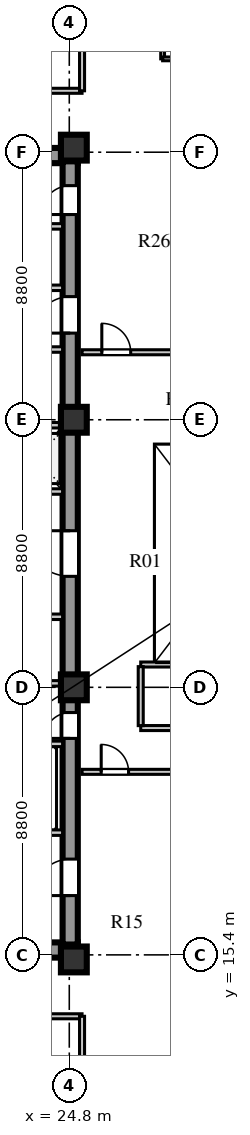
"""IFC4 building model, lengths in metres.
Left out: names, types, materials, properties, quantities, classifications, styles, units other than length and angle.
Written with IfcOpenShell. Run it as: python <this file> out.ifc"""

import sys

from ifc_helpers import new_model, si_unit, direction, frame, frame_2d, origin, origin_2d, place, context, subcontext, project, spatial, rectangle, extrude, element, fill, save


model = new_model("IFC4")
c1 = context("Model", 3, precision=1e-05, world=origin(), true_north=direction((0.0, 1.0)))
c2 = subcontext(c1, "Body", "Model", "MODEL_VIEW")
j1 = project(units=[si_unit("LENGTHUNIT", "METRE"), si_unit("PLANEANGLEUNIT", "RADIAN")], contexts=[c1])
p1 = place(None, origin())
s1 = spatial("IfcSite", under=j1, at=p1, CompositionType="ELEMENT")
p2 = place(p1, origin())
s2 = spatial("IfcBuilding", under=s1, at=p2, CompositionType="ELEMENT")
p3 = place(p2, frame((0.0, 0.0, 142.5)))
s3 = spatial("IfcBuildingStorey", under=s2, at=p3, CompositionType="ELEMENT", Elevation=142.5)
for number, where, z_axis, x_axis in (
    (1, (15.4, 15.56, 0.0), (0.0, 0.0, 1.0), (1.0, 0.0, 0.0)),
    (2, (15.4, 41.69, 0.0), (0.0, 0.0, 1.0), (1.0, 0.0, 0.0)),
):
    element("IfcWall", number, at=place(p3, frame(where, z_axis=z_axis, x_axis=x_axis)), inside=s3, PredefinedType="SHEAR", context=c2, shape_type="SweptSolid", body=[
        extrude(rectangle(XDim=9.68, YDim=0.5, at=frame_2d((4.84, 0.0))), origin(), (0.0, 0.0, 1.0), 3.6),
    ])
p4 = place(p3, frame((24.83, 15.74, 0.0), z_axis=(0.0, 0.0, 1.0), x_axis=(0.0, 1.0, 0.0)))
e3 = element("IfcWall", 3, at=p4, inside=s3, PredefinedType="SHEAR", context=c2, shape_type="SweptSolid", body=[
    extrude(rectangle(XDim=25.76, YDim=0.5, at=frame_2d((12.88, 0.0))), origin(), (0.0, 0.0, 1.0), 3.6),
])
p5 = place(p4, frame((1.61, 0.0, 0.0)))
e4 = element("IfcOpeningElement", 4, at=p5, cuts=e3, PredefinedType="OPENING", context=c2, shape_type="SweptSolid", body=[
    extrude(rectangle(XDim=1.2, YDim=2.1, at=frame_2d((0.6, 1.05))), frame((0.0, 0.26, 0.0), z_axis=(0.0, -1.0, 0.0), x_axis=(1.0, 0.0, 0.0)), (0.0, 0.0, 1.0), 0.52),
])
p6 = place(p4, frame((6.78, 0.0, 0.0)))
e5 = element("IfcOpeningElement", 5, at=p6, cuts=e3, PredefinedType="OPENING", context=c2, shape_type="SweptSolid", body=[
    extrude(rectangle(XDim=0.85, YDim=2.06, at=frame_2d((0.425, 1.03))), frame((0.0, 0.26, 0.0), z_axis=(0.0, -1.0, 0.0), x_axis=(1.0, 0.0, 0.0)), (0.0, 0.0, 1.0), 0.52),
])
p7 = place(p4, frame((12.11, 0.0, 0.0)))
e6 = element("IfcOpeningElement", 6, at=p7, cuts=e3, PredefinedType="OPENING", context=c2, shape_type="SweptSolid", body=[
    extrude(rectangle(XDim=1.5, YDim=2.12, at=frame_2d((0.75, 1.06))), frame((0.0, 0.26, 0.0), z_axis=(0.0, -1.0, 0.0), x_axis=(1.0, 0.0, 0.0)), (0.0, 0.0, 1.0), 0.52),
])
p8 = place(p4, frame((20.11, 0.0, 0.0)))
e7 = element("IfcOpeningElement", 7, at=p8, cuts=e3, PredefinedType="OPENING", context=c2, shape_type="SweptSolid", body=[
    extrude(rectangle(XDim=1.2, YDim=2.12, at=frame_2d((0.6, 1.06))), frame((0.0, 0.26, 0.0), z_axis=(0.0, -1.0, 0.0), x_axis=(1.0, 0.0, 0.0)), (0.0, 0.0, 1.0), 0.52),
])
p9 = place(p4, frame((24.01, 0.0, 0.0)))
e8 = element("IfcOpeningElement", 8, at=p9, cuts=e3, PredefinedType="OPENING", context=c2, shape_type="SweptSolid", body=[
    extrude(rectangle(XDim=0.95, YDim=2.1, at=frame_2d((0.475, 1.05))), frame((0.0, 0.26, 0.0), z_axis=(0.0, -1.0, 0.0), x_axis=(1.0, 0.0, 0.0)), (0.0, 0.0, 1.0), 0.52),
])
for number, where, z_axis, x_axis in (
    (9, (24.95, 15.25, 0.0), (0.0, 0.0, 1.0), (1.0, 0.0, 0.0)),
    (10, (24.95, 24.2, 0.0), (0.0, 0.0, 1.0), (1.0, 0.0, 0.0)),
    (11, (24.95, 33.0, 0.0), (0.0, 0.0, 1.0), (1.0, 0.0, 0.0)),
    (12, (24.95, 41.95, 0.0), (0.0, 0.0, 1.0), (1.0, 0.0, 0.0)),
):
    element("IfcColumn", number, at=place(p3, frame(where, z_axis=z_axis, x_axis=x_axis)), inside=s3, PredefinedType="COLUMN", context=c2, shape_type="SweptSolid", body=[
        extrude(rectangle(XDim=0.85, YDim=0.85, at=origin_2d()), origin(), (0.0, 0.0, 1.0), 3.6),
    ])
p10 = place(p3, frame((19.64, 19.42, 0.0), z_axis=(0.0, 0.0, 1.0), x_axis=(1.0, 0.0, 0.0)))
e13 = element("IfcWall", 13, at=p10, inside=s3, PredefinedType="SOLIDWALL", context=c2, shape_type="SweptSolid", body=[
    extrude(rectangle(XDim=4.94, YDim=0.18, at=frame_2d((2.47, 0.0))), origin(), (0.0, 0.0, 1.0), 3.6),
])
p11 = place(p10, frame((0.72, 0.0, 0.0)))
e14 = element("IfcOpeningElement", 14, at=p11, cuts=e13, PredefinedType="OPENING", context=c2, shape_type="SweptSolid", body=[
    extrude(rectangle(XDim=1.1, YDim=2.1, at=frame_2d((0.55, 1.05))), frame((0.0, 0.1, 0.0), z_axis=(0.0, -1.0, 0.0), x_axis=(1.0, 0.0, 0.0)), (0.0, 0.0, 1.0), 0.2),
])
p12 = place(p10, frame((3.02, 0.0, 0.0)))
e15 = element("IfcOpeningElement", 15, at=p12, cuts=e13, PredefinedType="OPENING", context=c2, shape_type="SweptSolid", body=[
    extrude(rectangle(XDim=1.1, YDim=2.1, at=frame_2d((0.55, 1.05))), frame((0.0, 0.1, 0.0), z_axis=(0.0, -1.0, 0.0), x_axis=(1.0, 0.0, 0.0)), (0.0, 0.0, 1.0), 0.2),
])
p13 = place(p3, frame((19.64, 22.34, 0.0), z_axis=(0.0, 0.0, 1.0), x_axis=(1.0, 0.0, 0.0)))
e16 = element("IfcWall", 16, at=p13, inside=s3, PredefinedType="SOLIDWALL", context=c2, shape_type="SweptSolid", body=[
    extrude(rectangle(XDim=4.94, YDim=0.18, at=frame_2d((2.47, 0.0))), origin(), (0.0, 0.0, 1.0), 3.6),
])
p14 = place(p3, frame((15.9, 26.52, 0.0), z_axis=(0.0, 0.0, 1.0), x_axis=(1.0, 0.0, 0.0)))
e17 = element("IfcWall", 17, at=p14, inside=s3, PredefinedType="SOLIDWALL", context=c2, shape_type="SweptSolid", body=[
    extrude(rectangle(XDim=8.68, YDim=0.18, at=frame_2d((4.34, 0.0))), origin(), (0.0, 0.0, 1.0), 3.6),
])
p15 = place(p14, frame((2.5, 0.0, 0.0)))
e18 = element("IfcOpeningElement", 18, at=p15, cuts=e17, PredefinedType="OPENING", context=c2, shape_type="SweptSolid", body=[
    extrude(rectangle(XDim=0.95, YDim=2.1, at=frame_2d((0.475, 1.05))), frame((0.0, 0.1, 0.0), z_axis=(0.0, -1.0, 0.0), x_axis=(1.0, 0.0, 0.0)), (0.0, 0.0, 1.0), 0.2),
])
p16 = place(p14, frame((6.0, 0.0, 0.0)))
e19 = element("IfcOpeningElement", 19, at=p16, cuts=e17, PredefinedType="OPENING", context=c2, shape_type="SweptSolid", body=[
    extrude(rectangle(XDim=0.95, YDim=2.1, at=frame_2d((0.475, 1.05))), frame((0.0, 0.1, 0.0), z_axis=(0.0, -1.0, 0.0), x_axis=(1.0, 0.0, 0.0)), (0.0, 0.0, 1.0), 0.2),
])
p17 = place(p3, frame((15.9, 24.33, 0.0), z_axis=(0.0, 0.0, 1.0), x_axis=(1.0, 0.0, 0.0)))
e20 = element("IfcWall", 20, at=p17, inside=s3, PredefinedType="SOLIDWALL", context=c2, shape_type="SweptSolid", body=[
    extrude(rectangle(XDim=8.68, YDim=0.18, at=frame_2d((4.34, 0.0))), origin(), (0.0, 0.0, 1.0), 2.95),
])
p18 = place(p3, frame((15.9, 30.64, 0.0), z_axis=(0.0, 0.0, 1.0), x_axis=(1.0, 0.0, 0.0)))
e21 = element("IfcWall", 21, at=p18, inside=s3, PredefinedType="SOLIDWALL", context=c2, shape_type="SweptSolid", body=[
    extrude(rectangle(XDim=8.68, YDim=0.18, at=frame_2d((4.34, 0.0))), origin(), (0.0, 0.0, 1.0), 3.6),
])
p19 = place(p18, frame((1.76, 0.0, 0.0)))
e22 = element("IfcOpeningElement", 22, at=p19, cuts=e21, PredefinedType="OPENING", context=c2, shape_type="SweptSolid", body=[
    extrude(rectangle(XDim=1.0, YDim=2.1, at=frame_2d((0.5, 1.05))), frame((0.0, 0.1, 0.0), z_axis=(0.0, -1.0, 0.0), x_axis=(1.0, 0.0, 0.0)), (0.0, 0.0, 1.0), 0.2),
])
p20 = place(p18, frame((3.6, 0.0, 0.0)))
e23 = element("IfcOpeningElement", 23, at=p20, cuts=e21, PredefinedType="OPENING", context=c2, shape_type="SweptSolid", body=[
    extrude(rectangle(XDim=1.0, YDim=2.1, at=frame_2d((0.5, 1.05))), frame((0.0, 0.1, 0.0), z_axis=(0.0, -1.0, 0.0), x_axis=(1.0, 0.0, 0.0)), (0.0, 0.0, 1.0), 0.2),
])
p21 = place(p18, frame((5.44, 0.0, 0.0)))
e24 = element("IfcOpeningElement", 24, at=p21, cuts=e21, PredefinedType="OPENING", context=c2, shape_type="SweptSolid", body=[
    extrude(rectangle(XDim=1.0, YDim=2.1, at=frame_2d((0.5, 1.05))), frame((0.0, 0.1, 0.0), z_axis=(0.0, -1.0, 0.0), x_axis=(1.0, 0.0, 0.0)), (0.0, 0.0, 1.0), 0.2),
])
p22 = place(p18, frame((7.28, 0.0, 0.0)))
e25 = element("IfcOpeningElement", 25, at=p22, cuts=e21, PredefinedType="OPENING", context=c2, shape_type="SweptSolid", body=[
    extrude(rectangle(XDim=1.0, YDim=2.1, at=frame_2d((0.5, 1.05))), frame((0.0, 0.1, 0.0), z_axis=(0.0, -1.0, 0.0), x_axis=(1.0, 0.0, 0.0)), (0.0, 0.0, 1.0), 0.2),
])
p23 = place(p3, frame((15.9, 32.82, 0.0), z_axis=(0.0, 0.0, 1.0), x_axis=(1.0, 0.0, 0.0)))
e26 = element("IfcWall", 26, at=p23, inside=s3, PredefinedType="SOLIDWALL", context=c2, shape_type="SweptSolid", body=[
    extrude(rectangle(XDim=8.68, YDim=0.18, at=frame_2d((4.34, 0.0))), origin(), (0.0, 0.0, 1.0), 2.95),
])
p24 = place(p3, frame((22.02, 35.31, 0.0), z_axis=(0.0, 0.0, 1.0), x_axis=(1.0, 0.0, 0.0)))
e27 = element("IfcWall", 27, at=p24, inside=s3, PredefinedType="SOLIDWALL", context=c2, shape_type="SweptSolid", body=[
    extrude(rectangle(XDim=2.56, YDim=0.18, at=frame_2d((1.28, 0.0))), origin(), (0.0, 0.0, 1.0), 3.6),
])
p25 = place(p24, frame((0.55, 0.0, 0.0)))
e28 = element("IfcOpeningElement", 28, at=p25, cuts=e27, PredefinedType="OPENING", context=c2, shape_type="SweptSolid", body=[
    extrude(rectangle(XDim=1.0, YDim=2.1, at=frame_2d((0.5, 1.05))), frame((0.0, 0.1, 0.0), z_axis=(0.0, -1.0, 0.0), x_axis=(1.0, 0.0, 0.0)), (0.0, 0.0, 1.0), 0.2),
])
p26 = place(p3, frame((19.64, 37.34, 0.0), z_axis=(0.0, 0.0, 1.0), x_axis=(1.0, 0.0, 0.0)))
e29 = element("IfcWall", 29, at=p26, inside=s3, PredefinedType="SOLIDWALL", context=c2, shape_type="SweptSolid", body=[
    extrude(rectangle(XDim=4.94, YDim=0.18, at=frame_2d((2.47, 0.0))), origin(), (0.0, 0.0, 1.0), 3.6),
])
p27 = place(p26, frame((0.45, 0.0, 0.0)))
e30 = element("IfcOpeningElement", 30, at=p27, cuts=e29, PredefinedType="OPENING", context=c2, shape_type="SweptSolid", body=[
    extrude(rectangle(XDim=1.0, YDim=2.1, at=frame_2d((0.5, 1.05))), frame((0.0, 0.1, 0.0), z_axis=(0.0, -1.0, 0.0), x_axis=(1.0, 0.0, 0.0)), (0.0, 0.0, 1.0), 0.2),
])
p28 = place(p26, frame((2.5, 0.0, 0.0)))
e31 = element("IfcOpeningElement", 31, at=p28, cuts=e29, PredefinedType="OPENING", context=c2, shape_type="SweptSolid", body=[
    extrude(rectangle(XDim=1.0, YDim=2.1, at=frame_2d((0.5, 1.05))), frame((0.0, 0.1, 0.0), z_axis=(0.0, -1.0, 0.0), x_axis=(1.0, 0.0, 0.0)), (0.0, 0.0, 1.0), 0.2),
])
p29 = place(p3, frame((19.64, 39.36, 0.0), z_axis=(0.0, 0.0, 1.0), x_axis=(1.0, 0.0, 0.0)))
e32 = element("IfcWall", 32, at=p29, inside=s3, PredefinedType="SOLIDWALL", context=c2, shape_type="SweptSolid", body=[
    extrude(rectangle(XDim=4.94, YDim=0.18, at=frame_2d((2.47, 0.0))), origin(), (0.0, 0.0, 1.0), 3.6),
])
p30 = place(p3, frame((25.22, 21.42, 0.0), z_axis=(0.0, 0.0, 1.0), x_axis=(1.0, 0.0, 0.0)))
e33 = element("IfcWall", 33, at=p30, inside=s3, PredefinedType="PARTITIONING", context=c2, shape_type="SweptSolid", body=[
    extrude(rectangle(XDim=15.6, YDim=0.165, at=frame_2d((7.8, 0.0))), origin(), (0.0, 0.0, 1.0), 3.2),
])
p31 = place(p30, frame((0.63, 0.0, 0.0)))
e34 = element("IfcOpeningElement", 34, at=p31, cuts=e33, PredefinedType="OPENING", context=c2, shape_type="SweptSolid", body=[
    extrude(rectangle(XDim=0.9, YDim=2.08, at=frame_2d((0.45, 1.04))), frame((0.0, 0.093, 0.0), z_axis=(0.0, -1.0, 0.0), x_axis=(1.0, 0.0, 0.0)), (0.0, 0.0, 1.0), 0.185),
])
p32 = place(p30, frame((3.71, 0.0, 0.0)))
e35 = element("IfcOpeningElement", 35, at=p32, cuts=e33, PredefinedType="OPENING", context=c2, shape_type="SweptSolid", body=[
    extrude(rectangle(XDim=0.9, YDim=2.08, at=frame_2d((0.45, 1.04))), frame((0.0, 0.093, 0.0), z_axis=(0.0, -1.0, 0.0), x_axis=(1.0, 0.0, 0.0)), (0.0, 0.0, 1.0), 0.185),
])
p33 = place(p30, frame((6.81, 0.0, 0.0)))
e36 = element("IfcOpeningElement", 36, at=p33, cuts=e33, PredefinedType="OPENING", context=c2, shape_type="SweptSolid", body=[
    extrude(rectangle(XDim=0.9, YDim=2.08, at=frame_2d((0.45, 1.04))), frame((0.0, 0.093, 0.0), z_axis=(0.0, -1.0, 0.0), x_axis=(1.0, 0.0, 0.0)), (0.0, 0.0, 1.0), 0.185),
])
p34 = place(p30, frame((9.91, 0.0, 0.0)))
e37 = element("IfcOpeningElement", 37, at=p34, cuts=e33, PredefinedType="OPENING", context=c2, shape_type="SweptSolid", body=[
    extrude(rectangle(XDim=0.9, YDim=2.08, at=frame_2d((0.45, 1.04))), frame((0.0, 0.093, 0.0), z_axis=(0.0, -1.0, 0.0), x_axis=(1.0, 0.0, 0.0)), (0.0, 0.0, 1.0), 0.185),
])
p35 = place(p30, frame((13.01, 0.0, 0.0)))
e38 = element("IfcOpeningElement", 38, at=p35, cuts=e33, PredefinedType="OPENING", context=c2, shape_type="SweptSolid", body=[
    extrude(rectangle(XDim=0.9, YDim=2.08, at=frame_2d((0.45, 1.04))), frame((0.0, 0.093, 0.0), z_axis=(0.0, -1.0, 0.0), x_axis=(1.0, 0.0, 0.0)), (0.0, 0.0, 1.0), 0.185),
])
p36 = place(p3, frame((27.15, 22.86, 0.0), z_axis=(0.0, 0.0, 1.0), x_axis=(1.0, 0.0, 0.0)))
e39 = element("IfcWall", 39, at=p36, inside=s3, PredefinedType="PARTITIONING", context=c2, shape_type="SweptSolid", body=[
    extrude(rectangle(XDim=13.67, YDim=0.165, at=frame_2d((6.835, 0.0))), origin(), (0.0, 0.0, 1.0), 3.6),
])
p37 = place(p36, frame((2.2, 0.0, 0.0)))
e40 = element("IfcOpeningElement", 40, at=p37, cuts=e39, PredefinedType="OPENING", context=c2, shape_type="SweptSolid", body=[
    extrude(rectangle(XDim=0.9, YDim=2.08, at=frame_2d((0.45, 1.04))), frame((0.0, 0.093, 0.0), z_axis=(0.0, -1.0, 0.0), x_axis=(1.0, 0.0, 0.0)), (0.0, 0.0, 1.0), 0.185),
])
p38 = place(p3, frame((25.22, 35.22, 0.0), z_axis=(0.0, 0.0, 1.0), x_axis=(1.0, 0.0, 0.0)))
e41 = element("IfcWall", 41, at=p38, inside=s3, PredefinedType="PARTITIONING", context=c2, shape_type="SweptSolid", body=[
    extrude(rectangle(XDim=9.5, YDim=0.165, at=frame_2d((4.75, 0.0))), origin(), (0.0, 0.0, 1.0), 3.6),
])
p39 = place(p38, frame((0.65, 0.0, 0.0)))
e42 = element("IfcOpeningElement", 42, at=p39, cuts=e41, PredefinedType="OPENING", context=c2, shape_type="SweptSolid", body=[
    extrude(rectangle(XDim=0.95, YDim=2.1, at=frame_2d((0.475, 1.05))), frame((0.0, 0.093, 0.0), z_axis=(0.0, -1.0, 0.0), x_axis=(1.0, 0.0, 0.0)), (0.0, 0.0, 1.0), 0.185),
])
p40 = place(p38, frame((5.4, 0.0, 0.0)))
e43 = element("IfcOpeningElement", 43, at=p40, cuts=e41, PredefinedType="OPENING", context=c2, shape_type="SweptSolid", body=[
    extrude(rectangle(XDim=1.05, YDim=2.1, at=frame_2d((0.525, 1.05))), frame((0.0, 0.093, 0.0), z_axis=(0.0, -1.0, 0.0), x_axis=(1.0, 0.0, 0.0)), (0.0, 0.0, 1.0), 0.185),
])
p41 = place(p3, frame((13.59, 13.38, 0.0), z_axis=(0.0, 0.0, 1.0), x_axis=(1.0, 0.0, 0.0)))
e44 = element("IfcWall", 44, at=p41, inside=s3, PredefinedType="PARTITIONING", context=c2, shape_type="SweptSolid", body=[
    extrude(rectangle(XDim=11.63, YDim=0.165, at=frame_2d((5.815, 0.0))), origin(), (0.0, 0.0, 1.0), 3.6),
])
p42 = place(p41, frame((4.56, 0.0, 0.0)))
e45 = element("IfcOpeningElement", 45, at=p42, cuts=e44, PredefinedType="OPENING", context=c2, shape_type="SweptSolid", body=[
    extrude(rectangle(XDim=1.0, YDim=2.08, at=frame_2d((0.5, 1.04))), frame((0.0, 0.093, 0.0), z_axis=(0.0, -1.0, 0.0), x_axis=(1.0, 0.0, 0.0)), (0.0, 0.0, 1.0), 0.185),
])
p43 = place(p3, frame((25.22, 10.28, 0.0), z_axis=(0.0, 0.0, 1.0), x_axis=(0.0, 1.0, 0.0)))
e46 = element("IfcWall", 46, at=p43, inside=s3, PredefinedType="PARTITIONING", context=c2, shape_type="SweptSolid", body=[
    extrude(rectangle(XDim=3.1, YDim=0.165, at=frame_2d((1.55, 0.0))), origin(), (0.0, 0.0, 1.0), 3.1),
])
p44 = place(p3, frame((13.59, 43.82, 0.0), z_axis=(0.0, 0.0, 1.0), x_axis=(1.0, 0.0, 0.0)))
e47 = element("IfcWall", 47, at=p44, inside=s3, PredefinedType="PARTITIONING", context=c2, shape_type="SweptSolid", body=[
    extrude(rectangle(XDim=11.63, YDim=0.165, at=frame_2d((5.815, 0.0))), origin(), (0.0, 0.0, 1.0), 3.6),
])
p45 = place(p44, frame((4.56, 0.0, 0.0)))
e48 = element("IfcOpeningElement", 48, at=p45, cuts=e47, PredefinedType="OPENING", context=c2, shape_type="SweptSolid", body=[
    extrude(rectangle(XDim=1.0, YDim=2.08, at=frame_2d((0.5, 1.04))), frame((0.0, 0.093, 0.0), z_axis=(0.0, -1.0, 0.0), x_axis=(1.0, 0.0, 0.0)), (0.0, 0.0, 1.0), 0.185),
])
p46 = place(p3, frame((25.22, 43.82, 0.0), z_axis=(0.0, 0.0, 1.0), x_axis=(0.0, 1.0, 0.0)))
e49 = element("IfcWall", 49, at=p46, inside=s3, PredefinedType="PARTITIONING", context=c2, shape_type="SweptSolid", body=[
    extrude(rectangle(XDim=3.1, YDim=0.165, at=frame_2d((1.55, 0.0))), origin(), (0.0, 0.0, 1.0), 3.1),
])
p47 = place(p3, frame((27.15, 24.95, 0.0), z_axis=(0.0, 0.0, 1.0), x_axis=(1.0, 0.0, 0.0)))
e50 = element("IfcWall", 50, at=p47, inside=s3, PredefinedType="PARTITIONING", context=c2, shape_type="SweptSolid", body=[
    extrude(rectangle(XDim=9.67, YDim=0.165, at=frame_2d((4.835, 0.0))), origin(), (0.0, 0.0, 1.0), 3.05),
])
p48 = place(p3, frame((27.15, 22.94, 0.0), z_axis=(0.0, 0.0, 1.0), x_axis=(0.0, 1.0, 0.0)))
e51 = element("IfcWall", 51, at=p48, inside=s3, PredefinedType="PARTITIONING", context=c2, shape_type="SweptSolid", body=[
    extrude(rectangle(XDim=1.94, YDim=0.165, at=frame_2d((0.97, 0.0))), origin(), (0.0, 0.0, 1.0), 3.6),
])
p49 = place(p3, frame((27.87, 44.87, 0.0), z_axis=(0.0, 0.0, 1.0), x_axis=(0.0, 1.0, 0.0)))
e52 = element("IfcWall", 52, at=p49, inside=s3, PredefinedType="PLUMBINGWALL", context=c2, shape_type="SweptSolid", body=[
    extrude(rectangle(XDim=2.05, YDim=0.125, at=frame_2d((1.025, 0.0))), origin(), (0.0, 0.0, 1.0), 3.6),
])
p50 = place(p3, frame((27.87, 44.87, 0.0), z_axis=(0.0, 0.0, 1.0), x_axis=(1.0, 0.0, 0.0)))
e53 = element("IfcWall", 53, at=p50, inside=s3, PredefinedType="PLUMBINGWALL", context=c2, shape_type="SweptSolid", body=[
    extrude(rectangle(XDim=2.05, YDim=0.125, at=frame_2d((1.025, 0.0))), origin(), (0.0, 0.0, 1.0), 3.6),
])
p51 = place(p50, frame((0.55, 0.0, 0.0)))
e54 = element("IfcOpeningElement", 54, at=p51, cuts=e53, PredefinedType="OPENING", context=c2, shape_type="SweptSolid", body=[
    extrude(rectangle(XDim=0.8, YDim=2.05, at=frame_2d((0.4, 1.025))), frame((0.0, 0.073, 0.0), z_axis=(0.0, -1.0, 0.0), x_axis=(1.0, 0.0, 0.0)), (0.0, 0.0, 1.0), 0.145),
])
p52 = place(p5, frame((1.2, 0.0, 0.0), z_axis=(0.0, 0.0, 1.0), x_axis=(-1.0, 0.0, 0.0)))
e55 = element("IfcDoor", 55, at=p52, inside=s3, OperationType="SINGLE_SWING_RIGHT", PredefinedType="DOOR", context=c2, shape_type="SweptSolid", body=[
    extrude(rectangle(XDim=1.2, YDim=2.1, at=frame_2d((0.6, 1.05))), frame((0.0, 0.025, 0.0), z_axis=(0.0, -1.0, 0.0), x_axis=(1.0, 0.0, 0.0)), (0.0, 0.0, 1.0), 0.05),
])
fill(e4, e55)
p53 = place(p6, frame((0.85, 0.0, 0.0), z_axis=(0.0, 0.0, 1.0), x_axis=(-1.0, 0.0, 0.0)))
e56 = element("IfcDoor", 56, at=p53, inside=s3, OperationType="SINGLE_SWING_RIGHT", PredefinedType="DOOR", context=c2, shape_type="SweptSolid", body=[
    extrude(rectangle(XDim=0.85, YDim=2.06, at=frame_2d((0.425, 1.03))), frame((0.0, 0.025, 0.0), z_axis=(0.0, -1.0, 0.0), x_axis=(1.0, 0.0, 0.0)), (0.0, 0.0, 1.0), 0.05),
])
fill(e5, e56)
p54 = place(p7, frame((1.5, 0.0, 0.0), z_axis=(0.0, 0.0, 1.0), x_axis=(-1.0, 0.0, 0.0)))
e57 = element("IfcDoor", 57, at=p54, inside=s3, OperationType="SINGLE_SWING_LEFT", PredefinedType="DOOR", context=c2, shape_type="SweptSolid", body=[
    extrude(rectangle(XDim=1.5, YDim=2.12, at=frame_2d((0.75, 1.06))), frame((0.0, 0.025, 0.0), z_axis=(0.0, -1.0, 0.0), x_axis=(1.0, 0.0, 0.0)), (0.0, 0.0, 1.0), 0.05),
])
fill(e6, e57)
p55 = place(p8, frame((1.2, 0.0, 0.0), z_axis=(0.0, 0.0, 1.0), x_axis=(-1.0, 0.0, 0.0)))
e58 = element("IfcDoor", 58, at=p55, inside=s3, OperationType="SINGLE_SWING_RIGHT", PredefinedType="DOOR", context=c2, shape_type="SweptSolid", body=[
    extrude(rectangle(XDim=1.2, YDim=2.12, at=frame_2d((0.6, 1.06))), frame((0.0, 0.025, 0.0), z_axis=(0.0, -1.0, 0.0), x_axis=(1.0, 0.0, 0.0)), (0.0, 0.0, 1.0), 0.05),
])
fill(e7, e58)
p56 = place(p9, frame((0.95, 0.0, 0.0), z_axis=(0.0, 0.0, 1.0), x_axis=(-1.0, 0.0, 0.0)))
e59 = element("IfcDoor", 59, at=p56, inside=s3, OperationType="SINGLE_SWING_RIGHT", PredefinedType="DOOR", context=c2, shape_type="SweptSolid", body=[
    extrude(rectangle(XDim=0.95, YDim=2.1, at=frame_2d((0.475, 1.05))), frame((0.0, 0.025, 0.0), z_axis=(0.0, -1.0, 0.0), x_axis=(1.0, 0.0, 0.0)), (0.0, 0.0, 1.0), 0.05),
])
fill(e8, e59)
p57 = place(p31, frame((0.9, 0.0, 0.0), z_axis=(0.0, 0.0, 1.0), x_axis=(-1.0, 0.0, 0.0)))
e60 = element("IfcDoor", 60, at=p57, inside=s3, OperationType="SINGLE_SWING_RIGHT", PredefinedType="DOOR", context=c2, shape_type="SweptSolid", body=[
    extrude(rectangle(XDim=0.9, YDim=2.08, at=frame_2d((0.45, 1.04))), frame((0.0, 0.025, 0.0), z_axis=(0.0, -1.0, 0.0), x_axis=(1.0, 0.0, 0.0)), (0.0, 0.0, 1.0), 0.05),
])
fill(e34, e60)
p58 = place(p39, origin())
e61 = element("IfcDoor", 61, at=p58, inside=s3, OperationType="SINGLE_SWING_LEFT", PredefinedType="DOOR", context=c2, shape_type="SweptSolid", body=[
    extrude(rectangle(XDim=0.95, YDim=2.1, at=frame_2d((0.475, 1.05))), frame((0.0, 0.025, 0.0), z_axis=(0.0, -1.0, 0.0), x_axis=(1.0, 0.0, 0.0)), (0.0, 0.0, 1.0), 0.05),
])
fill(e42, e61)
save(model, sys.argv[1])
